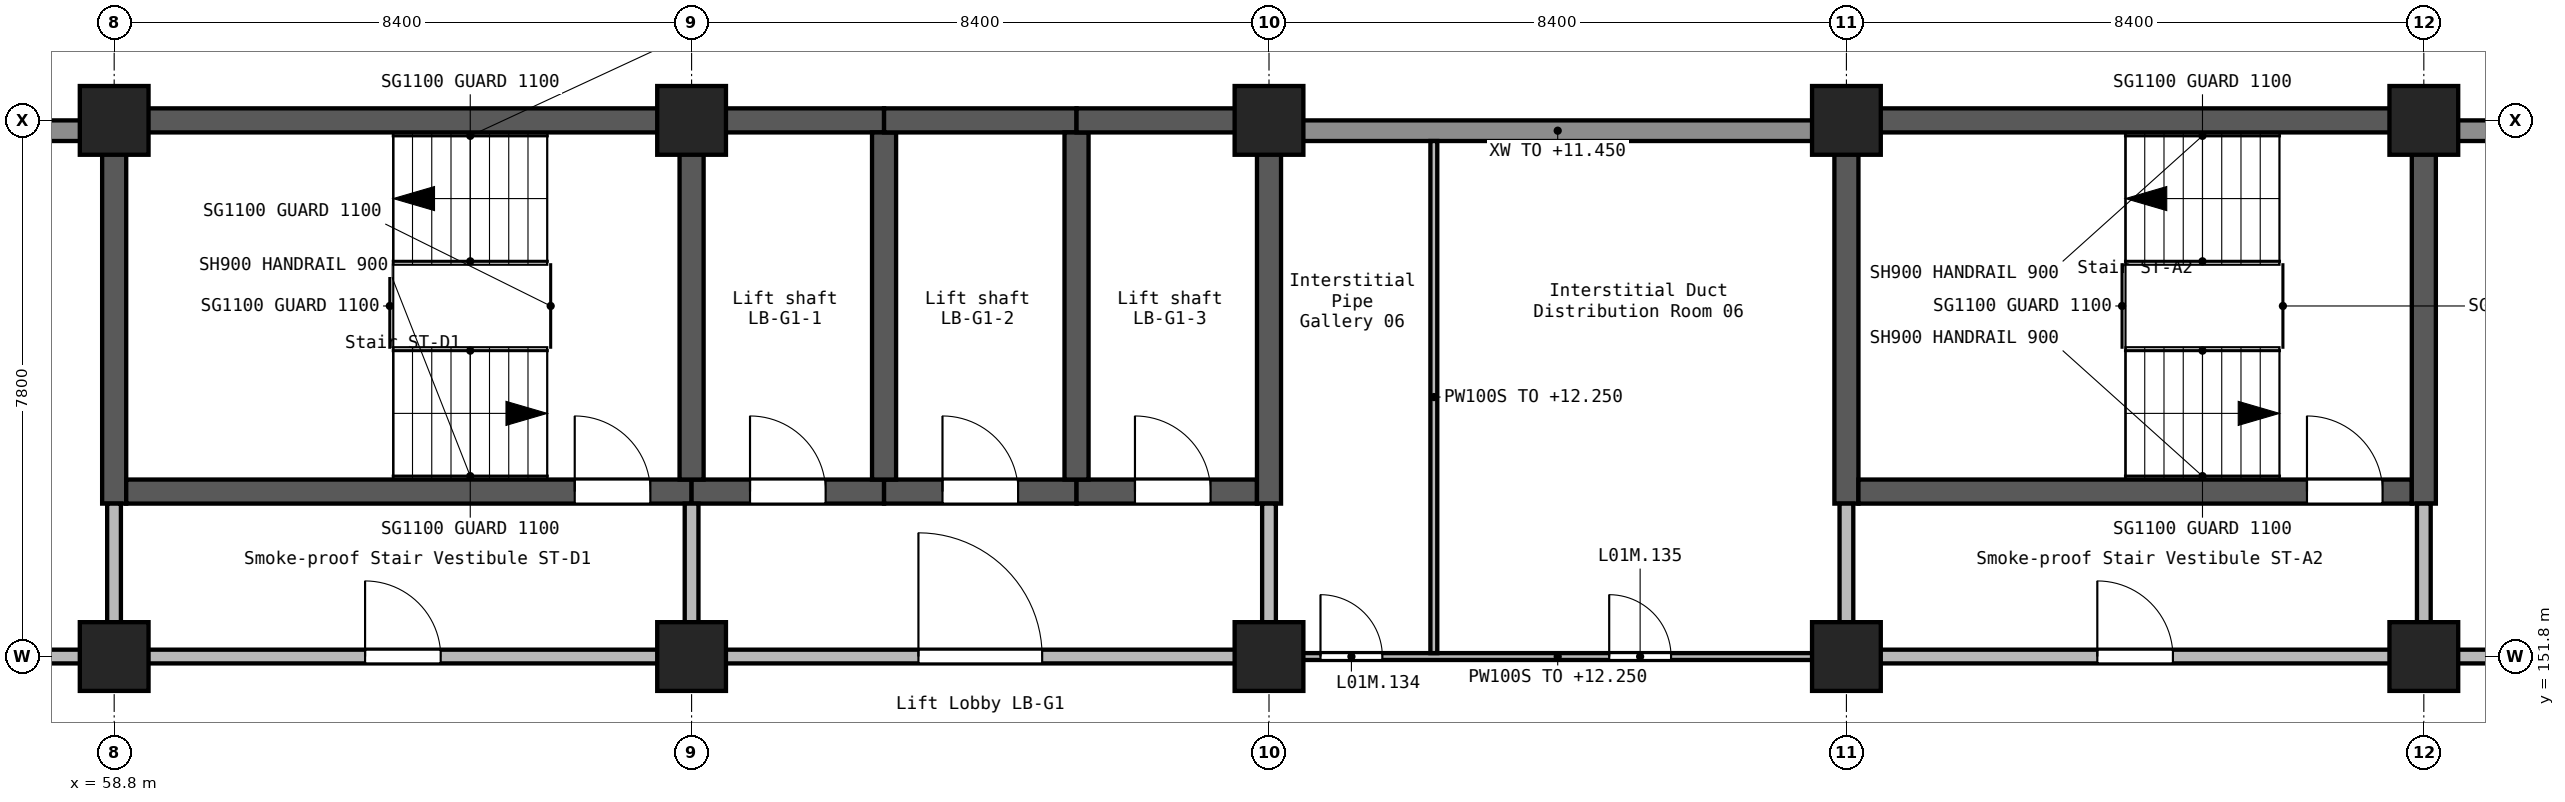
"""IFC4 building model, lengths in metres.
Left out: names, types, materials, properties, quantities, classifications, styles, units other than length and angle.
Written with IfcOpenShell. Run it as: python <this file> out.ifc"""

import sys

from ifc_helpers import new_model, si_unit, direction, frame, frame_2d, origin, origin_2d, place, context, subcontext, project, spatial, rectangle, extrude, element, fill, save


model = new_model("IFC4")
c1 = context("Model", 3, precision=1e-05, world=origin(), true_north=direction((0.0, 1.0)))
c2 = subcontext(c1, "Body", "Model", "MODEL_VIEW")
j1 = project(units=[si_unit("LENGTHUNIT", "METRE"), si_unit("PLANEANGLEUNIT", "RADIAN")], contexts=[c1])
p1 = place(None, origin())
s1 = spatial("IfcSite", under=j1, at=p1, CompositionType="ELEMENT")
p2 = place(p1, origin())
s2 = spatial("IfcBuilding", under=s1, at=p2, CompositionType="ELEMENT")
p3 = place(p2, frame((0.0, 0.0, 9.9)))
s3 = spatial("IfcBuildingStorey", under=s2, at=p3, CompositionType="ELEMENT", Elevation=9.9)
for number, where, z_axis, x_axis in (
    (1, (58.8, 151.8, 0.0), (0.0, 0.0, 1.0), (1.0, 0.0, 0.0)),
    (2, (58.8, 159.6, 0.0), (0.0, 0.0, 1.0), (1.0, 0.0, 0.0)),
    (3, (67.2, 151.8, 0.0), (0.0, 0.0, 1.0), (1.0, 0.0, 0.0)),
    (4, (67.2, 159.6, 0.0), (0.0, 0.0, 1.0), (1.0, 0.0, 0.0)),
    (5, (75.6, 151.8, 0.0), (0.0, 0.0, 1.0), (1.0, 0.0, 0.0)),
    (6, (75.6, 159.6, 0.0), (0.0, 0.0, 1.0), (1.0, 0.0, 0.0)),
    (7, (84.0, 151.8, 0.0), (0.0, 0.0, 1.0), (1.0, 0.0, 0.0)),
    (8, (84.0, 159.6, 0.0), (0.0, 0.0, 1.0), (1.0, 0.0, 0.0)),
    (9, (92.4, 151.8, 0.0), (0.0, 0.0, 1.0), (1.0, 0.0, 0.0)),
    (10, (92.4, 159.6, 0.0), (0.0, 0.0, 1.0), (1.0, 0.0, 0.0)),
):
    element("IfcColumn", number, at=place(p3, frame(where, z_axis=z_axis, x_axis=x_axis)), inside=s3, PredefinedType="COLUMN", context=c2, shape_type="SweptSolid", body=[
        extrude(rectangle(XDim=1.0, YDim=1.0, at=origin_2d()), origin(), (0.0, 0.0, 1.0), 2.7),
    ])
p4 = place(p3, frame((58.625, 159.6, 0.0), z_axis=(0.0, 0.0, 1.0), x_axis=(1.0, 0.0, 0.0)))
e11 = element("IfcWall", 11, at=p4, inside=s3, PredefinedType="SHEAR", context=c2, shape_type="SweptSolid", body=[
    extrude(rectangle(XDim=8.575, YDim=0.35, at=frame_2d((4.288, 0.0))), origin(), (0.0, 0.0, 1.0), 2.7),
])
p5 = place(p3, frame((58.8, 154.025, 0.0), z_axis=(0.0, 0.0, 1.0), x_axis=(0.0, 1.0, 0.0)))
e12 = element("IfcWall", 12, at=p5, inside=s3, PredefinedType="SHEAR", context=c2, shape_type="SweptSolid", body=[
    extrude(rectangle(XDim=5.4, YDim=0.35, at=frame_2d((2.7, 0.0))), origin(), (0.0, 0.0, 1.0), 2.7),
])
p6 = place(p3, frame((58.975, 154.2, 0.0), z_axis=(0.0, 0.0, 1.0), x_axis=(1.0, 0.0, 0.0)))
e13 = element("IfcWall", 13, at=p6, inside=s3, PredefinedType="SHEAR", context=c2, shape_type="SweptSolid", body=[
    extrude(rectangle(XDim=8.225, YDim=0.35, at=frame_2d((4.112, 0.0))), origin(), (0.0, 0.0, 1.0), 2.7),
])
p7 = place(p6, frame((6.525, 0.0, 0.0)))
e14 = element("IfcOpeningElement", 14, at=p7, cuts=e13, PredefinedType="OPENING", context=c2, shape_type="SweptSolid", body=[
    extrude(rectangle(XDim=1.1, YDim=2.1, at=frame_2d((0.55, 1.05))), frame((0.0, 0.185, 0.0), z_axis=(0.0, -1.0, 0.0), x_axis=(1.0, 0.0, 0.0)), (0.0, 0.0, 1.0), 0.37),
])
p8 = place(p3, frame((67.2, 154.2, 0.0), z_axis=(0.0, 0.0, 1.0), x_axis=(1.0, 0.0, 0.0)))
e15 = element("IfcWall", 15, at=p8, inside=s3, PredefinedType="SHEAR", context=c2, shape_type="SweptSolid", body=[
    extrude(rectangle(XDim=2.8, YDim=0.35, at=frame_2d((1.4, 0.0))), origin(), (0.0, 0.0, 1.0), 2.7),
])
p9 = place(p8, frame((0.85, 0.0, 0.0)))
e16 = element("IfcOpeningElement", 16, at=p9, cuts=e15, PredefinedType="OPENING", context=c2, shape_type="SweptSolid", body=[
    extrude(rectangle(XDim=1.1, YDim=2.1, at=frame_2d((0.55, 1.05))), frame((0.0, 0.185, 0.0), z_axis=(0.0, -1.0, 0.0), x_axis=(1.0, 0.0, 0.0)), (0.0, 0.0, 1.0), 0.37),
])
p10 = place(p3, frame((67.2, 154.375, 0.0), z_axis=(0.0, 0.0, 1.0), x_axis=(0.0, 1.0, 0.0)))
e17 = element("IfcWall", 17, at=p10, inside=s3, PredefinedType="SHEAR", context=c2, shape_type="SweptSolid", body=[
    extrude(rectangle(XDim=5.05, YDim=0.35, at=frame_2d((2.525, 0.0))), origin(), (0.0, 0.0, 1.0), 2.7),
])
p11 = place(p3, frame((67.2, 159.6, 0.0), z_axis=(0.0, 0.0, 1.0), x_axis=(1.0, 0.0, 0.0)))
e18 = element("IfcWall", 18, at=p11, inside=s3, PredefinedType="SHEAR", context=c2, shape_type="SweptSolid", body=[
    extrude(rectangle(XDim=2.8, YDim=0.35, at=frame_2d((1.4, 0.0))), origin(), (0.0, 0.0, 1.0), 2.7),
])
p12 = place(p3, frame((70.0, 154.2, 0.0), z_axis=(0.0, 0.0, 1.0), x_axis=(1.0, 0.0, 0.0)))
e19 = element("IfcWall", 19, at=p12, inside=s3, PredefinedType="SHEAR", context=c2, shape_type="SweptSolid", body=[
    extrude(rectangle(XDim=2.8, YDim=0.35, at=frame_2d((1.4, 0.0))), origin(), (0.0, 0.0, 1.0), 2.7),
])
p13 = place(p12, frame((0.85, 0.0, 0.0)))
e20 = element("IfcOpeningElement", 20, at=p13, cuts=e19, PredefinedType="OPENING", context=c2, shape_type="SweptSolid", body=[
    extrude(rectangle(XDim=1.1, YDim=2.1, at=frame_2d((0.55, 1.05))), frame((0.0, 0.185, 0.0), z_axis=(0.0, -1.0, 0.0), x_axis=(1.0, 0.0, 0.0)), (0.0, 0.0, 1.0), 0.37),
])
p14 = place(p3, frame((70.0, 154.375, 0.0), z_axis=(0.0, 0.0, 1.0), x_axis=(0.0, 1.0, 0.0)))
e21 = element("IfcWall", 21, at=p14, inside=s3, PredefinedType="SHEAR", context=c2, shape_type="SweptSolid", body=[
    extrude(rectangle(XDim=5.05, YDim=0.35, at=frame_2d((2.525, 0.0))), origin(), (0.0, 0.0, 1.0), 2.7),
])
p15 = place(p3, frame((70.0, 159.6, 0.0), z_axis=(0.0, 0.0, 1.0), x_axis=(1.0, 0.0, 0.0)))
e22 = element("IfcWall", 22, at=p15, inside=s3, PredefinedType="SHEAR", context=c2, shape_type="SweptSolid", body=[
    extrude(rectangle(XDim=2.8, YDim=0.35, at=frame_2d((1.4, 0.0))), origin(), (0.0, 0.0, 1.0), 2.7),
])
p16 = place(p3, frame((72.8, 154.2, 0.0), z_axis=(0.0, 0.0, 1.0), x_axis=(1.0, 0.0, 0.0)))
e23 = element("IfcWall", 23, at=p16, inside=s3, PredefinedType="SHEAR", context=c2, shape_type="SweptSolid", body=[
    extrude(rectangle(XDim=2.625, YDim=0.35, at=frame_2d((1.312, 0.0))), origin(), (0.0, 0.0, 1.0), 2.7),
])
p17 = place(p16, frame((0.85, 0.0, 0.0)))
e24 = element("IfcOpeningElement", 24, at=p17, cuts=e23, PredefinedType="OPENING", context=c2, shape_type="SweptSolid", body=[
    extrude(rectangle(XDim=1.1, YDim=2.1, at=frame_2d((0.55, 1.05))), frame((0.0, 0.185, 0.0), z_axis=(0.0, -1.0, 0.0), x_axis=(1.0, 0.0, 0.0)), (0.0, 0.0, 1.0), 0.37),
])
p18 = place(p3, frame((72.8, 154.375, 0.0), z_axis=(0.0, 0.0, 1.0), x_axis=(0.0, 1.0, 0.0)))
e25 = element("IfcWall", 25, at=p18, inside=s3, PredefinedType="SHEAR", context=c2, shape_type="SweptSolid", body=[
    extrude(rectangle(XDim=5.05, YDim=0.35, at=frame_2d((2.525, 0.0))), origin(), (0.0, 0.0, 1.0), 2.7),
])
p19 = place(p3, frame((72.8, 159.6, 0.0), z_axis=(0.0, 0.0, 1.0), x_axis=(1.0, 0.0, 0.0)))
e26 = element("IfcWall", 26, at=p19, inside=s3, PredefinedType="SHEAR", context=c2, shape_type="SweptSolid", body=[
    extrude(rectangle(XDim=2.625, YDim=0.35, at=frame_2d((1.312, 0.0))), origin(), (0.0, 0.0, 1.0), 2.7),
])
p20 = place(p3, frame((75.6, 154.025, 0.0), z_axis=(0.0, 0.0, 1.0), x_axis=(0.0, 1.0, 0.0)))
e27 = element("IfcWall", 27, at=p20, inside=s3, PredefinedType="SHEAR", context=c2, shape_type="SweptSolid", body=[
    extrude(rectangle(XDim=5.75, YDim=0.35, at=frame_2d((2.875, 0.0))), origin(), (0.0, 0.0, 1.0), 2.7),
])
p21 = place(p3, frame((83.825, 159.6, 0.0), z_axis=(0.0, 0.0, 1.0), x_axis=(1.0, 0.0, 0.0)))
e28 = element("IfcWall", 28, at=p21, inside=s3, PredefinedType="SHEAR", context=c2, shape_type="SweptSolid", body=[
    extrude(rectangle(XDim=8.4, YDim=0.35, at=frame_2d((4.2, 0.0))), origin(), (0.0, 0.0, 1.0), 2.7),
])
p22 = place(p3, frame((84.0, 154.025, 0.0), z_axis=(0.0, 0.0, 1.0), x_axis=(0.0, 1.0, 0.0)))
e29 = element("IfcWall", 29, at=p22, inside=s3, PredefinedType="SHEAR", context=c2, shape_type="SweptSolid", body=[
    extrude(rectangle(XDim=5.4, YDim=0.35, at=frame_2d((2.7, 0.0))), origin(), (0.0, 0.0, 1.0), 2.7),
])
p23 = place(p3, frame((84.175, 154.2, 0.0), z_axis=(0.0, 0.0, 1.0), x_axis=(1.0, 0.0, 0.0)))
e30 = element("IfcWall", 30, at=p23, inside=s3, PredefinedType="SHEAR", context=c2, shape_type="SweptSolid", body=[
    extrude(rectangle(XDim=8.05, YDim=0.35, at=frame_2d((4.025, 0.0))), origin(), (0.0, 0.0, 1.0), 2.7),
])
p24 = place(p23, frame((6.525, 0.0, 0.0)))
e31 = element("IfcOpeningElement", 31, at=p24, cuts=e30, PredefinedType="OPENING", context=c2, shape_type="SweptSolid", body=[
    extrude(rectangle(XDim=1.1, YDim=2.1, at=frame_2d((0.55, 1.05))), frame((0.0, 0.185, 0.0), z_axis=(0.0, -1.0, 0.0), x_axis=(1.0, 0.0, 0.0)), (0.0, 0.0, 1.0), 0.37),
])
p25 = place(p3, frame((92.4, 154.025, 0.0), z_axis=(0.0, 0.0, 1.0), x_axis=(0.0, 1.0, 0.0)))
e32 = element("IfcWall", 32, at=p25, inside=s3, PredefinedType="SHEAR", context=c2, shape_type="SweptSolid", body=[
    extrude(rectangle(XDim=5.75, YDim=0.35, at=frame_2d((2.875, 0.0))), origin(), (0.0, 0.0, 1.0), 2.7),
])
for number, where, z_axis, x_axis in (
    (33, (100.35, 159.45, 0.0), (0.0, 0.0, 1.0), (-1.0, 0.0, 0.0)),
    (34, (83.55, 159.45, 0.0), (0.0, 0.0, 1.0), (-1.0, 0.0, 0.0)),
    (35, (58.35, 159.45, 0.0), (0.0, 0.0, 1.0), (-1.0, 0.0, 0.0)),
):
    element("IfcWall", number, at=place(p3, frame(where, z_axis=z_axis, x_axis=x_axis)), inside=s3, PredefinedType="STANDARD", context=c2, shape_type="SweptSolid", body=[
        extrude(rectangle(XDim=7.5, YDim=0.3, at=frame_2d((3.75, 0.0))), origin(), (0.0, 0.0, 1.0), 1.55),
    ])
p26 = place(p3, frame((59.25, 151.8, 0.0), z_axis=(0.0, 0.0, 1.0), x_axis=(1.0, 0.0, 0.0)))
e36 = element("IfcWall", 36, at=p26, inside=s3, PredefinedType="SOLIDWALL", context=c2, shape_type="SweptSolid", body=[
    extrude(rectangle(XDim=7.5, YDim=0.2, at=frame_2d((3.75, 0.0))), origin(), (0.0, 0.0, 1.0), 2.35),
])
p27 = place(p26, frame((3.2, 0.0, 0.0)))
e37 = element("IfcOpeningElement", 37, at=p27, cuts=e36, PredefinedType="OPENING", context=c2, shape_type="SweptSolid", body=[
    extrude(rectangle(XDim=1.1, YDim=2.1, at=frame_2d((0.55, 1.05))), frame((0.0, 0.11, 0.0), z_axis=(0.0, -1.0, 0.0), x_axis=(1.0, 0.0, 0.0)), (0.0, 0.0, 1.0), 0.22),
])
p28 = place(p3, frame((67.65, 151.8, 0.0), z_axis=(0.0, 0.0, 1.0), x_axis=(1.0, 0.0, 0.0)))
e38 = element("IfcWall", 38, at=p28, inside=s3, PredefinedType="SOLIDWALL", context=c2, shape_type="SweptSolid", body=[
    extrude(rectangle(XDim=7.5, YDim=0.2, at=frame_2d((3.75, 0.0))), origin(), (0.0, 0.0, 1.0), 2.35),
])
p29 = place(p28, frame((2.85, 0.0, 0.0)))
e39 = element("IfcOpeningElement", 39, at=p29, cuts=e38, PredefinedType="OPENING", context=c2, shape_type="SweptSolid", body=[
    extrude(rectangle(XDim=1.8, YDim=2.1, at=frame_2d((0.9, 1.05))), frame((0.0, 0.11, 0.0), z_axis=(0.0, -1.0, 0.0), x_axis=(1.0, 0.0, 0.0)), (0.0, 0.0, 1.0), 0.22),
])
p30 = place(p3, frame((58.798, 152.25, 0.0), z_axis=(0.0, 0.0, 1.0), x_axis=(0.0, 1.0, 0.0)))
e40 = element("IfcWall", 40, at=p30, inside=s3, PredefinedType="SOLIDWALL", context=c2, shape_type="SweptSolid", body=[
    extrude(rectangle(XDim=1.775, YDim=0.2, at=frame_2d((0.887, 0.0))), origin(), (0.0, 0.0, 1.0), 2.35),
])
p31 = place(p3, frame((84.45, 151.8, 0.0), z_axis=(0.0, 0.0, 1.0), x_axis=(1.0, 0.0, 0.0)))
e41 = element("IfcWall", 41, at=p31, inside=s3, PredefinedType="SOLIDWALL", context=c2, shape_type="SweptSolid", body=[
    extrude(rectangle(XDim=7.5, YDim=0.2, at=frame_2d((3.75, 0.0))), origin(), (0.0, 0.0, 1.0), 2.35),
])
p32 = place(p31, frame((3.2, 0.0, 0.0)))
e42 = element("IfcOpeningElement", 42, at=p32, cuts=e41, PredefinedType="OPENING", context=c2, shape_type="SweptSolid", body=[
    extrude(rectangle(XDim=1.1, YDim=2.1, at=frame_2d((0.55, 1.05))), frame((0.0, 0.11, 0.0), z_axis=(0.0, -1.0, 0.0), x_axis=(1.0, 0.0, 0.0)), (0.0, 0.0, 1.0), 0.22),
])
p33 = place(p3, frame((92.85, 151.8, 0.0), z_axis=(0.0, 0.0, 1.0), x_axis=(1.0, 0.0, 0.0)))
e43 = element("IfcWall", 43, at=p33, inside=s3, PredefinedType="SOLIDWALL", context=c2, shape_type="SweptSolid", body=[
    extrude(rectangle(XDim=7.5, YDim=0.2, at=frame_2d((3.75, 0.0))), origin(), (0.0, 0.0, 1.0), 2.35),
])
p34 = place(p33, frame((2.849, 0.0, 0.0)))
e44 = element("IfcOpeningElement", 44, at=p34, cuts=e43, PredefinedType="OPENING", context=c2, shape_type="SweptSolid", body=[
    extrude(rectangle(XDim=1.8, YDim=2.1, at=frame_2d((0.9, 1.05))), frame((0.0, 0.11, 0.0), z_axis=(0.0, -1.0, 0.0), x_axis=(1.0, 0.0, 0.0)), (0.0, 0.0, 1.0), 0.22),
])
p35 = place(p3, frame((92.4, 152.25, 0.0), z_axis=(0.0, 0.0, 1.0), x_axis=(0.0, 1.0, 0.0)))
e45 = element("IfcWall", 45, at=p35, inside=s3, PredefinedType="SOLIDWALL", context=c2, shape_type="SweptSolid", body=[
    extrude(rectangle(XDim=1.775, YDim=0.2, at=frame_2d((0.887, 0.0))), origin(), (0.0, 0.0, 1.0), 2.35),
])
p36 = place(p3, frame((52.898, 151.8, 0.0), z_axis=(0.0, 0.0, 1.0), x_axis=(1.0, 0.0, 0.0)))
e46 = element("IfcWall", 46, at=p36, inside=s3, PredefinedType="SOLIDWALL", context=c2, shape_type="SweptSolid", body=[
    extrude(rectangle(XDim=5.452, YDim=0.2, at=frame_2d((2.726, 0.0))), origin(), (0.0, 0.0, 1.0), 2.35),
])
p37 = place(p36, frame((2.4, 0.0, 0.0)))
e47 = element("IfcOpeningElement", 47, at=p37, cuts=e46, PredefinedType="OPENING", context=c2, shape_type="SweptSolid", body=[
    extrude(rectangle(XDim=1.0, YDim=2.1, at=frame_2d((0.5, 1.05))), frame((0.0, 0.11, 0.0), z_axis=(0.0, -1.0, 0.0), x_axis=(1.0, 0.0, 0.0)), (0.0, 0.0, 1.0), 0.22),
])
for number, where, z_axis, x_axis in (
    (48, (67.2, 152.25, 0.0), (0.0, 0.0, 1.0), (0.0, 1.0, 0.0)),
    (49, (75.6, 152.25, 0.0), (0.0, 0.0, 1.0), (0.0, 1.0, 0.0)),
    (50, (84.0, 152.25, 0.0), (0.0, 0.0, 1.0), (0.0, 1.0, 0.0)),
):
    element("IfcWall", number, at=place(p3, frame(where, z_axis=z_axis, x_axis=x_axis)), inside=s3, PredefinedType="SOLIDWALL", context=c2, shape_type="SweptSolid", body=[
        extrude(rectangle(XDim=1.775, YDim=0.2, at=frame_2d((0.887, 0.0))), origin(), (0.0, 0.0, 1.0), 2.35),
    ])
p38 = place(p3, frame((76.05, 151.8, 0.0), z_axis=(0.0, 0.0, 1.0), x_axis=(1.0, 0.0, 0.0)))
e51 = element("IfcWall", 51, at=p38, inside=s3, PredefinedType="PARTITIONING", context=c2, shape_type="SweptSolid", body=[
    extrude(rectangle(XDim=7.5, YDim=0.1, at=frame_2d((3.75, 0.0))), origin(), (0.0, 0.0, 1.0), 2.35),
])
p39 = place(p38, frame((0.299, 0.0, 0.0)))
e52 = element("IfcOpeningElement", 52, at=p39, cuts=e51, PredefinedType="OPENING", context=c2, shape_type="SweptSolid", body=[
    extrude(rectangle(XDim=0.9, YDim=2.1, at=frame_2d((0.45, 1.05))), frame((0.0, 0.06, 0.0), z_axis=(0.0, -1.0, 0.0), x_axis=(1.0, 0.0, 0.0)), (0.0, 0.0, 1.0), 0.12),
])
p40 = place(p38, frame((4.499, 0.0, 0.0)))
e53 = element("IfcOpeningElement", 53, at=p40, cuts=e51, PredefinedType="OPENING", context=c2, shape_type="SweptSolid", body=[
    extrude(rectangle(XDim=0.9, YDim=2.1, at=frame_2d((0.45, 1.05))), frame((0.0, 0.06, 0.0), z_axis=(0.0, -1.0, 0.0), x_axis=(1.0, 0.0, 0.0)), (0.0, 0.0, 1.0), 0.12),
])
p41 = place(p3, frame((77.998, 151.85, 0.0), z_axis=(0.0, 0.0, 1.0), x_axis=(0.0, 1.0, 0.0)))
e54 = element("IfcWall", 54, at=p41, inside=s3, PredefinedType="PARTITIONING", context=c2, shape_type="SweptSolid", body=[
    extrude(rectangle(XDim=7.45, YDim=0.1, at=frame_2d((3.725, 0.0))), origin(), (0.0, 0.0, 1.0), 2.35),
])
p42 = place(p9, origin())
e55 = element("IfcDoor", 55, at=p42, inside=s3, OperationType="DOUBLE_DOOR_SLIDING", PredefinedType="DOOR", context=c2, shape_type="SweptSolid", body=[
    extrude(rectangle(XDim=1.1, YDim=2.1, at=frame_2d((0.55, 1.05))), frame((0.0, 0.025, 0.0), z_axis=(0.0, -1.0, 0.0), x_axis=(1.0, 0.0, 0.0)), (0.0, 0.0, 1.0), 0.05),
])
fill(e16, e55)
p43 = place(p13, origin())
e56 = element("IfcDoor", 56, at=p43, inside=s3, OperationType="DOUBLE_DOOR_SLIDING", PredefinedType="DOOR", context=c2, shape_type="SweptSolid", body=[
    extrude(rectangle(XDim=1.1, YDim=2.1, at=frame_2d((0.55, 1.05))), frame((0.0, 0.025, 0.0), z_axis=(0.0, -1.0, 0.0), x_axis=(1.0, 0.0, 0.0)), (0.0, 0.0, 1.0), 0.05),
])
fill(e20, e56)
p44 = place(p17, origin())
e57 = element("IfcDoor", 57, at=p44, inside=s3, OperationType="DOUBLE_DOOR_SLIDING", PredefinedType="DOOR", context=c2, shape_type="SweptSolid", body=[
    extrude(rectangle(XDim=1.1, YDim=2.1, at=frame_2d((0.55, 1.05))), frame((0.0, 0.025, 0.0), z_axis=(0.0, -1.0, 0.0), x_axis=(1.0, 0.0, 0.0)), (0.0, 0.0, 1.0), 0.05),
])
fill(e24, e57)
p45 = place(p24, origin())
e58 = element("IfcDoor", 58, at=p45, inside=s3, OperationType="SINGLE_SWING_RIGHT", PredefinedType="DOOR", context=c2, shape_type="SweptSolid", body=[
    extrude(rectangle(XDim=1.1, YDim=2.1, at=frame_2d((0.55, 1.05))), frame((0.0, 0.025, 0.0), z_axis=(0.0, -1.0, 0.0), x_axis=(1.0, 0.0, 0.0)), (0.0, 0.0, 1.0), 0.05),
])
fill(e31, e58)
p46 = place(p7, origin())
e59 = element("IfcDoor", 59, at=p46, inside=s3, OperationType="SINGLE_SWING_RIGHT", PredefinedType="DOOR", context=c2, shape_type="SweptSolid", body=[
    extrude(rectangle(XDim=1.1, YDim=2.1, at=frame_2d((0.55, 1.05))), frame((0.0, 0.025, 0.0), z_axis=(0.0, -1.0, 0.0), x_axis=(1.0, 0.0, 0.0)), (0.0, 0.0, 1.0), 0.05),
])
fill(e14, e59)
p47 = place(p32, origin())
e60 = element("IfcDoor", 60, at=p47, inside=s3, OperationType="SINGLE_SWING_RIGHT", PredefinedType="DOOR", context=c2, shape_type="SweptSolid", body=[
    extrude(rectangle(XDim=1.1, YDim=2.1, at=frame_2d((0.55, 1.05))), frame((0.0, 0.025, 0.0), z_axis=(0.0, -1.0, 0.0), x_axis=(1.0, 0.0, 0.0)), (0.0, 0.0, 1.0), 0.05),
])
fill(e42, e60)
p48 = place(p27, origin())
e61 = element("IfcDoor", 61, at=p48, inside=s3, OperationType="SINGLE_SWING_RIGHT", PredefinedType="DOOR", context=c2, shape_type="SweptSolid", body=[
    extrude(rectangle(XDim=1.1, YDim=2.1, at=frame_2d((0.55, 1.05))), frame((0.0, 0.025, 0.0), z_axis=(0.0, -1.0, 0.0), x_axis=(1.0, 0.0, 0.0)), (0.0, 0.0, 1.0), 0.05),
])
fill(e37, e61)
p49 = place(p29, origin())
e62 = element("IfcDoor", 62, at=p49, inside=s3, OperationType="DOUBLE_DOOR_SINGLE_SWING", PredefinedType="DOOR", context=c2, shape_type="SweptSolid", body=[
    extrude(rectangle(XDim=1.8, YDim=2.1, at=frame_2d((0.9, 1.05))), frame((0.0, 0.025, 0.0), z_axis=(0.0, -1.0, 0.0), x_axis=(1.0, 0.0, 0.0)), (0.0, 0.0, 1.0), 0.05),
])
fill(e39, e62)
p50 = place(p39, origin())
e63 = element("IfcDoor", 63, at=p50, inside=s3, OperationType="SINGLE_SWING_LEFT", PredefinedType="DOOR", context=c2, shape_type="SweptSolid", body=[
    extrude(rectangle(XDim=0.9, YDim=2.1, at=frame_2d((0.45, 1.05))), frame((0.0, 0.025, 0.0), z_axis=(0.0, -1.0, 0.0), x_axis=(1.0, 0.0, 0.0)), (0.0, 0.0, 1.0), 0.05),
])
fill(e52, e63)
p51 = place(p40, origin())
e64 = element("IfcDoor", 64, at=p51, inside=s3, OperationType="SINGLE_SWING_RIGHT", PredefinedType="DOOR", context=c2, shape_type="SweptSolid", body=[
    extrude(rectangle(XDim=0.9, YDim=2.1, at=frame_2d((0.45, 1.05))), frame((0.0, 0.025, 0.0), z_axis=(0.0, -1.0, 0.0), x_axis=(1.0, 0.0, 0.0)), (0.0, 0.0, 1.0), 0.05),
])
fill(e53, e64)
save(model, sys.argv[1])
